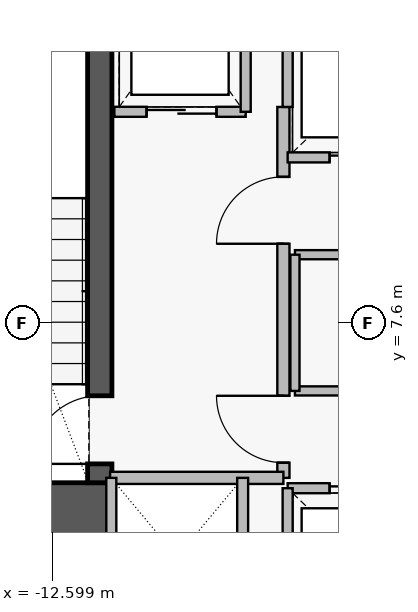
"""IFC4 building model, lengths in metres.
Left out: names, types, materials, properties, quantities, classifications, styles, units other than length and angle.
Written with IfcOpenShell. Run it as: python <this file> out.ifc"""

import sys

from ifc_helpers import new_model, si_unit, direction, frame, frame_2d, origin, place, context, subcontext, project, spatial, rectangle, extrude, element, fill, save


model = new_model("IFC4")
c1 = context("Model", 3, precision=1e-05, world=origin(), true_north=direction((0.0, 1.0)))
c2 = subcontext(c1, "Body", "Model", "MODEL_VIEW")
j1 = project(units=[si_unit("LENGTHUNIT", "METRE"), si_unit("PLANEANGLEUNIT", "RADIAN")], contexts=[c1])
p1 = place(None, origin())
s1 = spatial("IfcSite", under=j1, at=p1, CompositionType="ELEMENT")
p2 = place(p1, origin())
s2 = spatial("IfcBuilding", under=s1, at=p2, CompositionType="ELEMENT")
p3 = place(p2, frame((0.0, 0.0, 49.5)))
s3 = spatial("IfcBuildingStorey", under=s2, at=p3, CompositionType="ELEMENT", Elevation=49.5)
p4 = place(p3, frame((-16.31, 4.52, 0.0), z_axis=(0.0, 0.0, 1.0), x_axis=(1.0, 0.0, 0.0)))
e1 = element("IfcWall", 1, at=p4, inside=s3, PredefinedType="SHEAR", context=c2, shape_type="SweptSolid", body=[
    extrude(rectangle(XDim=4.71, YDim=0.9, at=frame_2d((2.355, 0.0))), origin(), (0.0, 0.0, 1.0), 3.46),
])
p5 = place(p3, frame((-11.82, 4.97, 0.0), z_axis=(0.0, 0.0, 1.0), x_axis=(0.0, 1.0, 0.0)))
e2 = element("IfcWall", 2, at=p5, inside=s3, PredefinedType="SHEAR", context=c2, shape_type="SweptSolid", body=[
    extrude(rectangle(XDim=8.96, YDim=0.4, at=frame_2d((4.48, 0.0))), origin(), (0.0, 0.0, 1.0), 3.46),
])
p6 = place(p5, frame((0.31, 0.0, 0.0)))
e3 = element("IfcOpeningElement", 3, at=p6, cuts=e2, PredefinedType="OPENING", context=c2, shape_type="SweptSolid", body=[
    extrude(rectangle(XDim=1.12, YDim=2.22, at=frame_2d((0.56, 1.11))), frame((0.0, 0.21, 0.0), z_axis=(0.0, -1.0, 0.0), x_axis=(1.0, 0.0, 0.0)), (0.0, 0.0, 1.0), 0.42),
])
p7 = place(p3, frame((-8.8, 5.05, 0.0), z_axis=(0.0, 0.0, 1.0), x_axis=(0.0, 1.0, 0.0)))
e4 = element("IfcWall", 4, at=p7, inside=s3, PredefinedType="PARTITIONING", context=c2, shape_type="SweptSolid", body=[
    extrude(rectangle(XDim=6.1, YDim=0.2, at=frame_2d((3.05, 0.0))), origin(), (0.0, 0.0, 1.0), 3.43),
])
p8 = place(p7, frame((0.25, 0.0, 0.0)))
e5 = element("IfcOpeningElement", 5, at=p8, cuts=e4, PredefinedType="OPENING", context=c2, shape_type="SweptSolid", body=[
    extrude(rectangle(XDim=1.1, YDim=2.2, at=frame_2d((0.55, 1.1))), frame((0.0, 0.11, 0.0), z_axis=(0.0, -1.0, 0.0), x_axis=(1.0, 0.0, 0.0)), (0.0, 0.0, 1.0), 0.22),
])
p9 = place(p7, frame((3.85, 0.0, 0.0)))
e6 = element("IfcOpeningElement", 6, at=p9, cuts=e4, PredefinedType="OPENING", context=c2, shape_type="SweptSolid", body=[
    extrude(rectangle(XDim=1.1, YDim=2.2, at=frame_2d((0.55, 1.1))), frame((0.0, 0.11, 0.0), z_axis=(0.0, -1.0, 0.0), x_axis=(1.0, 0.0, 0.0)), (0.0, 0.0, 1.0), 0.22),
])
p10 = place(p3, frame((-11.58, 11.07, 0.0), z_axis=(0.0, 0.0, 1.0), x_axis=(1.0, 0.0, 0.0)))
e7 = element("IfcWall", 7, at=p10, inside=s3, PredefinedType="PARTITIONING", context=c2, shape_type="SweptSolid", body=[
    extrude(rectangle(XDim=2.16, YDim=0.165, at=frame_2d((1.08, 0.0))), origin(), (0.0, 0.0, 1.0), 3.43),
])
p11 = place(p10, frame((0.53, 0.0, 0.0)))
e8 = element("IfcOpeningElement", 8, at=p11, cuts=e7, PredefinedType="OPENING", context=c2, shape_type="SweptSolid", body=[
    extrude(rectangle(XDim=1.15, YDim=2.25, at=frame_2d((0.575, 1.125))), frame((0.0, 0.093, 0.0), z_axis=(0.0, -1.0, 0.0), x_axis=(1.0, 0.0, 0.0)), (0.0, 0.0, 1.0), 0.185),
])
p12 = place(p3, frame((-8.73, 4.88, 0.0), z_axis=(0.0, 0.0, 1.0), x_axis=(1.0, 0.0, 0.0)))
e9 = element("IfcWall", 9, at=p12, inside=s3, PredefinedType="PARTITIONING", context=c2, shape_type="SweptSolid", body=[
    extrude(rectangle(XDim=2.48, YDim=0.165, at=frame_2d((1.24, 0.0))), origin(), (0.0, 0.0, 1.0), 3.43),
])
p13 = place(p12, frame((0.69, 0.0, 0.0)))
e10 = element("IfcOpeningElement", 10, at=p13, cuts=e9, PredefinedType="OPENING", context=c2, shape_type="SweptSolid", body=[
    extrude(rectangle(XDim=1.1, YDim=2.25, at=frame_2d((0.55, 1.125))), frame((0.0, 0.093, 0.0), z_axis=(0.0, -1.0, 0.0), x_axis=(1.0, 0.0, 0.0)), (0.0, 0.0, 1.0), 0.185),
])
p14 = place(p3, frame((-8.73, 10.32, 0.0), z_axis=(0.0, 0.0, 1.0), x_axis=(1.0, 0.0, 0.0)))
e11 = element("IfcWall", 11, at=p14, inside=s3, PredefinedType="PARTITIONING", context=c2, shape_type="SweptSolid", body=[
    extrude(rectangle(XDim=2.48, YDim=0.165, at=frame_2d((1.24, 0.0))), origin(), (0.0, 0.0, 1.0), 3.43),
])
p15 = place(p14, frame((0.69, 0.0, 0.0)))
e12 = element("IfcOpeningElement", 12, at=p15, cuts=e11, PredefinedType="OPENING", context=c2, shape_type="SweptSolid", body=[
    extrude(rectangle(XDim=1.1, YDim=2.25, at=frame_2d((0.55, 1.125))), frame((0.0, 0.093, 0.0), z_axis=(0.0, -1.0, 0.0), x_axis=(1.0, 0.0, 0.0)), (0.0, 0.0, 1.0), 0.185),
])
p16 = place(p3, frame((-8.61, 6.48, 0.0), z_axis=(0.0, 0.0, 1.0), x_axis=(1.0, 0.0, 0.0)))
e13 = element("IfcWall", 13, at=p16, inside=s3, PredefinedType="PARTITIONING", context=c2, shape_type="SweptSolid", body=[
    extrude(rectangle(XDim=3.62, YDim=0.15, at=frame_2d((1.81, 0.0))), origin(), (0.0, 0.0, 1.0), 3.43),
])
p17 = place(p16, frame((1.36, 0.0, 0.0)))
e14 = element("IfcOpeningElement", 14, at=p17, cuts=e13, PredefinedType="OPENING", context=c2, shape_type="SweptSolid", body=[
    extrude(rectangle(XDim=0.9, YDim=2.15, at=frame_2d((0.45, 1.075))), frame((0.0, 0.085, 0.0), z_axis=(0.0, -1.0, 0.0), x_axis=(1.0, 0.0, 0.0)), (0.0, 0.0, 1.0), 0.17),
])
p18 = place(p3, frame((-11.65, 5.05, 0.0), z_axis=(0.0, 0.0, 1.0), x_axis=(1.0, 0.0, 0.0)))
e15 = element("IfcWall", 15, at=p18, inside=s3, PredefinedType="PARTITIONING", context=c2, shape_type="SweptSolid", body=[
    extrude(rectangle(XDim=2.85, YDim=0.2, at=frame_2d((1.425, 0.0))), origin(), (0.0, 0.0, 1.0), 3.43),
])
p19 = place(p3, frame((-9.42, 11.07, 0.0), z_axis=(0.0, 0.0, 1.0), x_axis=(0.0, 1.0, 0.0)))
e16 = element("IfcWall", 16, at=p19, inside=s3, PredefinedType="PARTITIONING", context=c2, shape_type="SweptSolid", body=[
    extrude(rectangle(XDim=2.96, YDim=0.165, at=frame_2d((1.48, 0.0))), origin(), (0.0, 0.0, 1.0), 3.43),
])
p20 = place(p3, frame((-8.73, 2.52, 0.0), z_axis=(0.0, 0.0, 1.0), x_axis=(0.0, 1.0, 0.0)))
e17 = element("IfcWall", 17, at=p20, inside=s3, PredefinedType="PARTITIONING", context=c2, shape_type="SweptSolid", body=[
    extrude(rectangle(XDim=2.36, YDim=0.165, at=frame_2d((1.18, 0.0))), origin(), (0.0, 0.0, 1.0), 3.43),
])
p21 = place(p3, frame((-8.73, 11.15, 0.0), z_axis=(0.0, 0.0, 1.0), x_axis=(0.0, 1.0, 0.0)))
e18 = element("IfcWall", 18, at=p21, inside=s3, PredefinedType="PARTITIONING", context=c2, shape_type="SweptSolid", body=[
    extrude(rectangle(XDim=1.53, YDim=0.165, at=frame_2d((0.765, 0.0))), origin(), (0.0, 0.0, 1.0), 3.43),
])
p22 = place(p3, frame((-9.47, 2.45, 0.0), z_axis=(0.0, 0.0, 1.0), x_axis=(0.0, 1.0, 0.0)))
e19 = element("IfcWall", 19, at=p22, inside=s3, PredefinedType="PARTITIONING", context=c2, shape_type="SweptSolid", body=[
    extrude(rectangle(XDim=2.6, YDim=0.18, at=frame_2d((1.3, 0.0))), origin(), (0.0, 0.0, 1.0), 3.43),
])
p23 = place(p3, frame((-11.63, 2.47, 0.0), z_axis=(0.0, 0.0, 1.0), x_axis=(0.0, 1.0, 0.0)))
e20 = element("IfcWall", 20, at=p23, inside=s3, PredefinedType="PARTITIONING", context=c2, shape_type="SweptSolid", body=[
    extrude(rectangle(XDim=2.58, YDim=0.165, at=frame_2d((1.29, 0.0))), origin(), (0.0, 0.0, 1.0), 3.43),
])
p24 = place(p3, frame((-8.61, 8.72, 0.0), z_axis=(0.0, 0.0, 1.0), x_axis=(1.0, 0.0, 0.0)))
e21 = element("IfcWall", 21, at=p24, inside=s3, PredefinedType="PARTITIONING", context=c2, shape_type="SweptSolid", body=[
    extrude(rectangle(XDim=3.62, YDim=0.15, at=frame_2d((1.81, 0.0))), origin(), (0.0, 0.0, 1.0), 3.43),
])
p25 = place(p3, frame((-8.61, 6.48, 0.0), z_axis=(0.0, 0.0, 1.0), x_axis=(0.0, 1.0, 0.0)))
e22 = element("IfcWall", 22, at=p25, inside=s3, PredefinedType="PARTITIONING", context=c2, shape_type="SweptSolid", body=[
    extrude(rectangle(XDim=2.24, YDim=0.15, at=frame_2d((1.12, 0.0))), origin(), (0.0, 0.0, 1.0), 3.43),
])
p26 = place(p6, origin())
e23 = element("IfcDoor", 23, at=p26, inside=s3, OperationType="SINGLE_SWING_LEFT", PredefinedType="DOOR", context=c2, shape_type="SweptSolid", body=[
    extrude(rectangle(XDim=1.12, YDim=2.22, at=frame_2d((0.56, 1.11))), frame((0.0, 0.025, 0.0), z_axis=(0.0, -1.0, 0.0), x_axis=(1.0, 0.0, 0.0)), (0.0, 0.0, 1.0), 0.05),
])
fill(e3, e23)
p27 = place(p8, origin())
e24 = element("IfcDoor", 24, at=p27, inside=s3, OperationType="SINGLE_SWING_RIGHT", PredefinedType="DOOR", context=c2, shape_type="SweptSolid", body=[
    extrude(rectangle(XDim=1.1, YDim=2.2, at=frame_2d((0.55, 1.1))), frame((0.0, 0.025, 0.0), z_axis=(0.0, -1.0, 0.0), x_axis=(1.0, 0.0, 0.0)), (0.0, 0.0, 1.0), 0.05),
])
fill(e5, e24)
p28 = place(p9, origin())
e25 = element("IfcDoor", 25, at=p28, inside=s3, OperationType="SINGLE_SWING_LEFT", PredefinedType="DOOR", context=c2, shape_type="SweptSolid", body=[
    extrude(rectangle(XDim=1.1, YDim=2.2, at=frame_2d((0.55, 1.1))), frame((0.0, 0.025, 0.0), z_axis=(0.0, -1.0, 0.0), x_axis=(1.0, 0.0, 0.0)), (0.0, 0.0, 1.0), 0.05),
])
fill(e6, e25)
p29 = place(p11, origin())
e26 = element("IfcDoor", 26, at=p29, inside=s3, OperationType="SLIDING_TO_LEFT", PredefinedType="DOOR", context=c2, shape_type="SweptSolid", body=[
    extrude(rectangle(XDim=1.15, YDim=2.25, at=frame_2d((0.575, 1.125))), frame((0.0, 0.025, 0.0), z_axis=(0.0, -1.0, 0.0), x_axis=(1.0, 0.0, 0.0)), (0.0, 0.0, 1.0), 0.05),
])
fill(e8, e26)
p30 = place(p13, origin())
e27 = element("IfcDoor", 27, at=p30, inside=s3, OperationType="SLIDING_TO_LEFT", PredefinedType="DOOR", context=c2, shape_type="SweptSolid", body=[
    extrude(rectangle(XDim=1.1, YDim=2.25, at=frame_2d((0.55, 1.125))), frame((0.0, 0.025, 0.0), z_axis=(0.0, -1.0, 0.0), x_axis=(1.0, 0.0, 0.0)), (0.0, 0.0, 1.0), 0.05),
])
fill(e10, e27)
p31 = place(p15, origin())
e28 = element("IfcDoor", 28, at=p31, inside=s3, OperationType="SLIDING_TO_LEFT", PredefinedType="DOOR", context=c2, shape_type="SweptSolid", body=[
    extrude(rectangle(XDim=1.1, YDim=2.25, at=frame_2d((0.55, 1.125))), frame((0.0, 0.025, 0.0), z_axis=(0.0, -1.0, 0.0), x_axis=(1.0, 0.0, 0.0)), (0.0, 0.0, 1.0), 0.05),
])
fill(e12, e28)
save(model, sys.argv[1])
